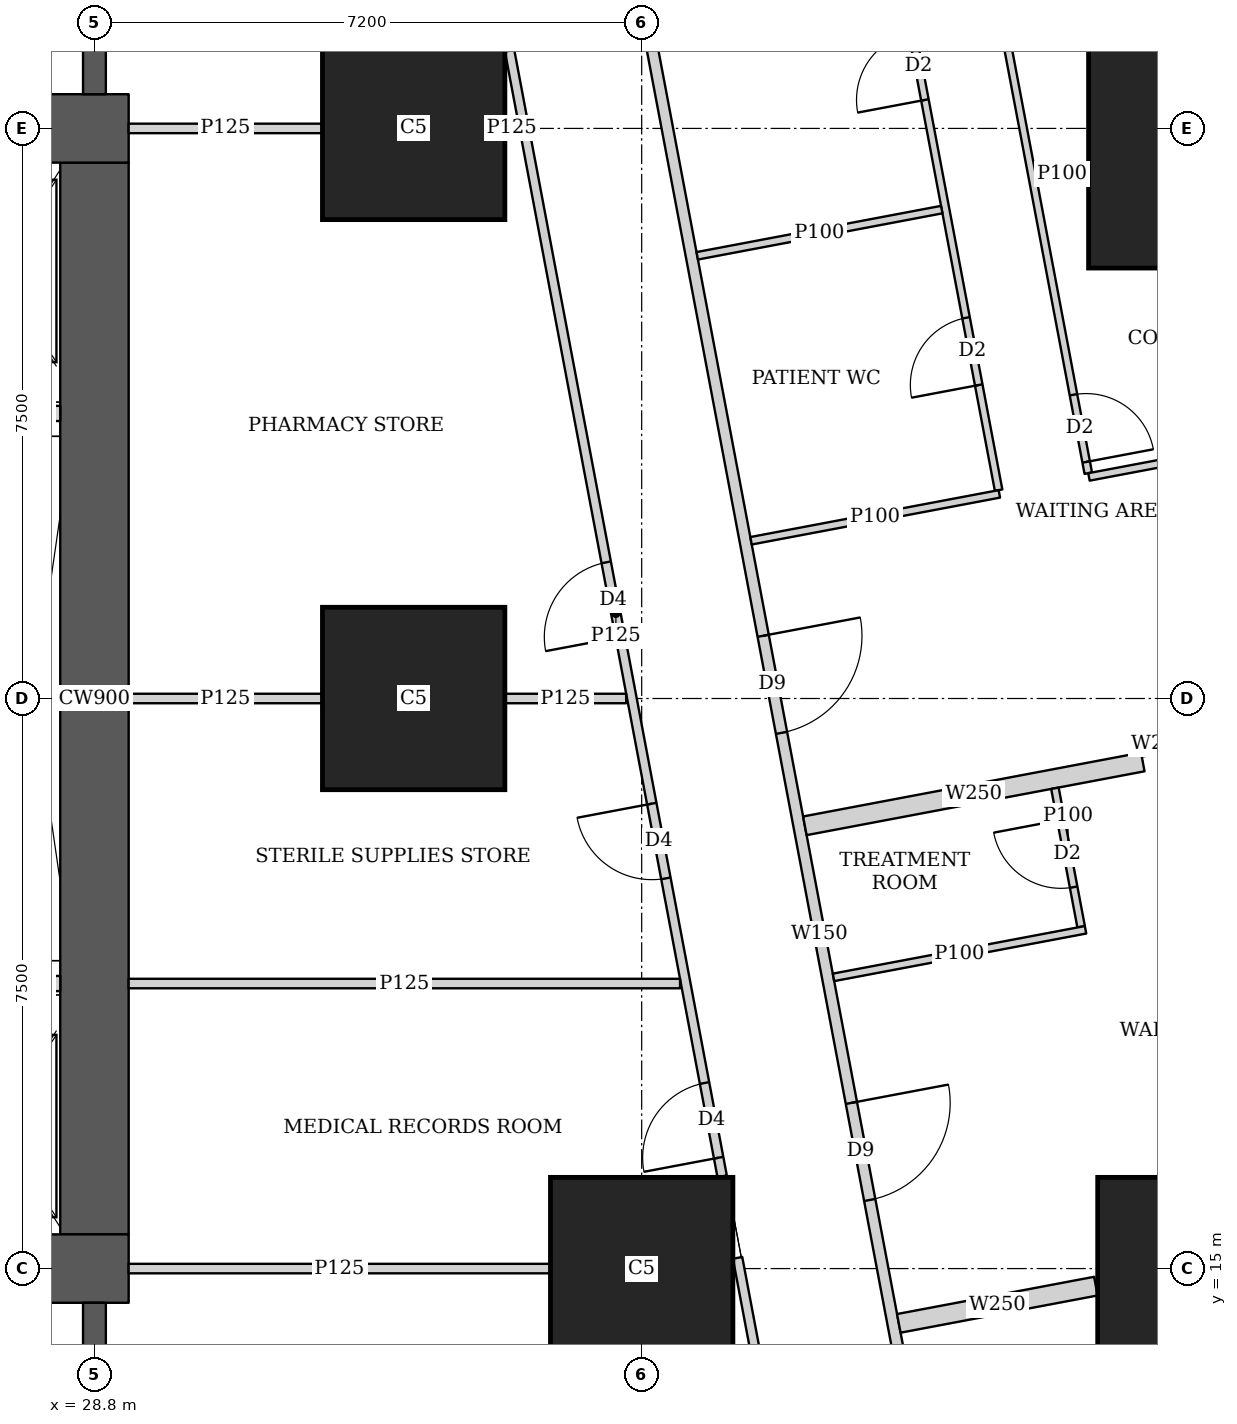
"""IFC4 building model, lengths in metres.
Left out: names, types, materials, properties, quantities, classifications, styles, units other than length and angle.
Written with IfcOpenShell. Run it as: python <this file> out.ifc"""

import sys

from ifc_helpers import new_model, si_unit, direction, frame, frame_2d, origin, origin_2d, place, context, subcontext, project, spatial, rectangle, extrude, element, fill, save


model = new_model("IFC4")
c1 = context("Model", 3, precision=1e-05, world=origin(), true_north=direction((0.0, 1.0)))
c2 = subcontext(c1, "Body", "Model", "MODEL_VIEW")
j1 = project(units=[si_unit("LENGTHUNIT", "METRE"), si_unit("PLANEANGLEUNIT", "RADIAN")], contexts=[c1])
p1 = place(None, origin())
s1 = spatial("IfcSite", under=j1, at=p1, CompositionType="ELEMENT")
p2 = place(p1, origin())
s2 = spatial("IfcBuilding", under=s1, at=p2, CompositionType="ELEMENT")
p3 = place(p2, frame((0.0, 0.0, 5.6)))
s3 = spatial("IfcBuildingStorey", under=s2, at=p3, CompositionType="ELEMENT", Elevation=5.6)
for number, where, z_axis, x_axis in (
    (1, (36.0, 15.0, 0.0), (0.0, 0.0, 1.0), (1.0, 0.0, 0.0)),
    (2, (43.2, 15.0, 0.0), (0.0, 0.0, 1.0), (1.0, 0.0, 0.0)),
    (3, (33.0, 22.5, 0.0), (0.0, 0.0, 1.0), (1.0, 0.0, 0.0)),
    (4, (33.0, 30.0, 0.0), (0.0, 0.0, 1.0), (1.0, 0.0, 0.0)),
):
    element("IfcColumn", number, at=place(p3, frame(where, z_axis=z_axis, x_axis=x_axis)), inside=s3, PredefinedType="COLUMN", context=c2, shape_type="SweptSolid", body=[
        extrude(rectangle(XDim=2.4, YDim=2.4, at=origin_2d()), origin(), (0.0, 0.0, 1.0), 4.5),
    ])
p4 = place(p3, frame((43.48, 29.763, 0.0), z_axis=(0.0, 0.0, 1.0), x_axis=(1.0, 0.0, 0.0)))
e5 = element("IfcColumn", 5, at=p4, inside=s3, PredefinedType="COLUMN", context=c2, shape_type="SweptSolid", body=[
    extrude(rectangle(XDim=3.2, YDim=3.2, at=origin_2d()), origin(), (0.0, 0.0, 1.0), 4.5),
])
p5 = place(p3, frame((13.95, 15.0, 0.0), z_axis=(0.0, 0.0, 1.0), x_axis=(1.0, 0.0, 0.0)))
e6 = element("IfcWall", 6, at=p5, inside=s3, PredefinedType="SHEAR", context=c2, shape_type="SweptSolid", body=[
    extrude(rectangle(XDim=15.3, YDim=0.9, at=frame_2d((7.65, 0.0))), origin(), (0.0, 0.0, 1.0), 4.5),
])
p6 = place(p5, frame((4.45, 0.0, 0.0)))
e7 = element("IfcOpeningElement", 7, at=p6, cuts=e6, PredefinedType="OPENING", context=c2, shape_type="SweptSolid", body=[
    extrude(rectangle(XDim=1.8, YDim=2.1, at=frame_2d((0.9, 1.05))), frame((0.0, 0.46, 0.0), z_axis=(0.0, -1.0, 0.0), x_axis=(1.0, 0.0, 0.0)), (0.0, 0.0, 1.0), 0.92),
])
p7 = place(p5, frame((10.7, 0.0, 0.0)))
e8 = element("IfcOpeningElement", 8, at=p7, cuts=e6, PredefinedType="OPENING", context=c2, shape_type="SweptSolid", body=[
    extrude(rectangle(XDim=1.1, YDim=2.1, at=frame_2d((0.55, 1.05))), frame((0.0, 0.46, 0.0), z_axis=(0.0, -1.0, 0.0), x_axis=(1.0, 0.0, 0.0)), (0.0, 0.0, 1.0), 0.92),
])
p8 = place(p3, frame((13.95, 30.0, 0.0), z_axis=(0.0, 0.0, 1.0), x_axis=(1.0, 0.0, 0.0)))
e9 = element("IfcWall", 9, at=p8, inside=s3, PredefinedType="SHEAR", context=c2, shape_type="SweptSolid", body=[
    extrude(rectangle(XDim=15.3, YDim=0.9, at=frame_2d((7.65, 0.0))), origin(), (0.0, 0.0, 1.0), 4.5),
])
p9 = place(p8, frame((4.45, 0.0, 0.0)))
e10 = element("IfcOpeningElement", 10, at=p9, cuts=e9, PredefinedType="OPENING", context=c2, shape_type="SweptSolid", body=[
    extrude(rectangle(XDim=1.8, YDim=2.1, at=frame_2d((0.9, 1.05))), frame((0.0, 0.46, 0.0), z_axis=(0.0, -1.0, 0.0), x_axis=(1.0, 0.0, 0.0)), (0.0, 0.0, 1.0), 0.92),
])
p10 = place(p8, frame((10.7, 0.0, 0.0)))
e11 = element("IfcOpeningElement", 11, at=p10, cuts=e9, PredefinedType="OPENING", context=c2, shape_type="SweptSolid", body=[
    extrude(rectangle(XDim=1.1, YDim=2.1, at=frame_2d((0.55, 1.05))), frame((0.0, 0.46, 0.0), z_axis=(0.0, -1.0, 0.0), x_axis=(1.0, 0.0, 0.0)), (0.0, 0.0, 1.0), 0.92),
])
p11 = place(p3, frame((28.8, 15.45, 0.0), z_axis=(0.0, 0.0, 1.0), x_axis=(0.0, 1.0, 0.0)))
e12 = element("IfcWall", 12, at=p11, inside=s3, PredefinedType="SHEAR", context=c2, shape_type="SweptSolid", body=[
    extrude(rectangle(XDim=14.1, YDim=0.9, at=frame_2d((7.05, 0.0))), origin(), (0.0, 0.0, 1.0), 4.5),
])
for number, where, z_axis, x_axis in (
    (13, (28.8, 10.35, 0.0), (0.0, 0.0, 1.0), (0.0, 1.0, 0.0)),
    (14, (28.8, 30.45, 0.0), (0.0, 0.0, 1.0), (0.0, 1.0, 0.0)),
):
    element("IfcWall", number, at=place(p3, frame(where, z_axis=z_axis, x_axis=x_axis)), inside=s3, PredefinedType="SHEAR", context=c2, shape_type="SweptSolid", body=[
        extrude(rectangle(XDim=4.2, YDim=0.3, at=frame_2d((2.1, 0.0))), origin(), (0.0, 0.0, 1.0), 4.5),
    ])
p12 = place(p3, frame((35.151, 36.285, 0.0), z_axis=(0.0, 0.0, 1.0), x_axis=(0.18558085056, -0.982628998099, 0.0)))
e15 = element("IfcWall", 15, at=p12, inside=s3, PredefinedType="SOLIDWALL", context=c2, shape_type="SweptSolid", body=[
    extrude(rectangle(XDim=34.352, YDim=0.15, at=frame_2d((17.176, 0.0))), origin(), (0.0, 0.0, 1.0), 2.4),
])
p13 = place(p12, frame((13.189, 0.0, 0.0)))
e16 = element("IfcOpeningElement", 16, at=p13, cuts=e15, PredefinedType="OPENING", context=c2, shape_type="SweptSolid", body=[
    extrude(rectangle(XDim=1.3, YDim=2.1, at=frame_2d((0.65, 1.05))), frame((0.0, 0.085, 0.0), z_axis=(0.0, -1.0, 0.0), x_axis=(1.0, 0.0, 0.0)), (0.0, 0.0, 1.0), 0.17),
])
p14 = place(p12, frame((19.443, 0.0, 0.0)))
e17 = element("IfcOpeningElement", 17, at=p14, cuts=e15, PredefinedType="OPENING", context=c2, shape_type="SweptSolid", body=[
    extrude(rectangle(XDim=1.3, YDim=2.1, at=frame_2d((0.65, 1.05))), frame((0.0, 0.085, 0.0), z_axis=(0.0, -1.0, 0.0), x_axis=(1.0, 0.0, 0.0)), (0.0, 0.0, 1.0), 0.17),
])
p15 = place(p12, frame((25.444, 0.0, 0.0)))
e18 = element("IfcOpeningElement", 18, at=p15, cuts=e15, PredefinedType="OPENING", context=c2, shape_type="SweptSolid", body=[
    extrude(rectangle(XDim=1.3, YDim=2.1, at=frame_2d((0.65, 1.05))), frame((0.0, 0.085, 0.0), z_axis=(0.0, -1.0, 0.0), x_axis=(1.0, 0.0, 0.0)), (0.0, 0.0, 1.0), 0.17),
])
p16 = place(p3, frame((38.956, 40.92, 0.0), z_axis=(0.0, 0.0, 1.0), x_axis=(0.185636914727, -0.982618408077, 0.0)))
e19 = element("IfcWall", 19, at=p16, inside=s3, PredefinedType="PARTITIONING", context=c2, shape_type="SweptSolid", body=[
    extrude(rectangle(XDim=15.729, YDim=0.1, at=frame_2d((7.865, 0.0))), origin(), (0.0, 0.0, 1.0), 2.6),
])
p17 = place(p16, frame((14.679, 0.0, 0.0)))
e20 = element("IfcOpeningElement", 20, at=p17, cuts=e19, PredefinedType="OPENING", context=c2, shape_type="SweptSolid", body=[
    extrude(rectangle(XDim=0.9, YDim=2.1, at=frame_2d((0.45, 1.05))), frame((0.0, 0.06, 0.0), z_axis=(0.0, -1.0, 0.0), x_axis=(1.0, 0.0, 0.0)), (0.0, 0.0, 1.0), 0.12),
])
p18 = place(p16, frame((9.0, 0.0, 0.0)))
e21 = element("IfcOpeningElement", 21, at=p18, cuts=e19, PredefinedType="OPENING", context=c2, shape_type="SweptSolid", body=[
    extrude(rectangle(XDim=0.9, YDim=2.1, at=frame_2d((0.45, 1.05))), frame((0.0, 0.06, 0.0), z_axis=(0.0, -1.0, 0.0), x_axis=(1.0, 0.0, 0.0)), (0.0, 0.0, 1.0), 0.12),
])
p19 = place(p16, frame((7.046, 0.0, 0.0)))
e22 = element("IfcOpeningElement", 22, at=p19, cuts=e19, PredefinedType="OPENING", context=c2, shape_type="SweptSolid", body=[
    extrude(rectangle(XDim=0.9, YDim=2.1, at=frame_2d((0.45, 1.05))), frame((0.0, 0.06, 0.0), z_axis=(0.0, -1.0, 0.0), x_axis=(1.0, 0.0, 0.0)), (0.0, 0.0, 1.0), 0.12),
])
p20 = place(p16, frame((3.231, 0.0, 0.0)))
e23 = element("IfcOpeningElement", 23, at=p20, cuts=e19, PredefinedType="OPENING", context=c2, shape_type="SweptSolid", body=[
    extrude(rectangle(XDim=0.9, YDim=2.1, at=frame_2d((0.45, 1.05))), frame((0.0, 0.06, 0.0), z_axis=(0.0, -1.0, 0.0), x_axis=(1.0, 0.0, 0.0)), (0.0, 0.0, 1.0), 0.12),
])
p21 = place(p3, frame((36.842, 45.65, 0.0), z_axis=(0.0, 0.0, 1.0), x_axis=(0.185559483963, -0.982633033188, 0.0)))
e24 = element("IfcWall", 24, at=p21, inside=s3, PredefinedType="PARTITIONING", context=c2, shape_type="SweptSolid", body=[
    extrude(rectangle(XDim=20.77, YDim=0.1, at=frame_2d((10.385, 0.0))), origin(), (0.0, 0.0, 1.0), 2.4),
])
p22 = place(p21, frame((18.462, 0.0, 0.0)))
e25 = element("IfcOpeningElement", 25, at=p22, cuts=e24, PredefinedType="OPENING", context=c2, shape_type="SweptSolid", body=[
    extrude(rectangle(XDim=0.9, YDim=2.1, at=frame_2d((0.45, 1.05))), frame((0.0, 0.06, 0.0), z_axis=(0.0, -1.0, 0.0), x_axis=(1.0, 0.0, 0.0)), (0.0, 0.0, 1.0), 0.12),
])
p23 = place(p21, frame((14.645, 0.0, 0.0)))
e26 = element("IfcOpeningElement", 26, at=p23, cuts=e24, PredefinedType="OPENING", context=c2, shape_type="SweptSolid", body=[
    extrude(rectangle(XDim=0.9, YDim=2.1, at=frame_2d((0.45, 1.05))), frame((0.0, 0.06, 0.0), z_axis=(0.0, -1.0, 0.0), x_axis=(1.0, 0.0, 0.0)), (0.0, 0.0, 1.0), 0.12),
])
p24 = place(p21, frame((5.655, 0.0, 0.0)))
e27 = element("IfcOpeningElement", 27, at=p24, cuts=e24, PredefinedType="OPENING", context=c2, shape_type="SweptSolid", body=[
    extrude(rectangle(XDim=0.9, YDim=2.1, at=frame_2d((0.45, 1.05))), frame((0.0, 0.06, 0.0), z_axis=(0.0, -1.0, 0.0), x_axis=(1.0, 0.0, 0.0)), (0.0, 0.0, 1.0), 0.12),
])
p25 = place(p3, frame((41.87, 29.459, 0.0), z_axis=(0.0, 0.0, 1.0), x_axis=(-0.982722777639, -0.185083608972, 0.0)))
e28 = element("IfcWall", 28, at=p25, inside=s3, PredefinedType="PARTITIONING", context=c2, shape_type="SweptSolid", body=[
    extrude(rectangle(XDim=0.686, YDim=0.1, at=frame_2d((0.343, 0.0))), origin(), (0.0, 0.0, 1.0), 2.6),
])
p26 = place(p3, frame((46.11, 26.213, 0.0), z_axis=(0.0, 0.0, 1.0), x_axis=(-0.982633535512, -0.185556823879, 0.0)))
e29 = element("IfcWall", 29, at=p26, inside=s3, PredefinedType="PARTITIONING", context=c2, shape_type="SweptSolid", body=[
    extrude(rectangle(XDim=4.3, YDim=0.1, at=frame_2d((2.15, 0.0))), origin(), (0.0, 0.0, 1.0), 2.4),
])
p27 = place(p3, frame((39.948, 28.932, 0.0), z_axis=(0.0, 0.0, 1.0), x_axis=(-0.982610347627, -0.185679575441, 0.0)))
e30 = element("IfcWall", 30, at=p27, inside=s3, PredefinedType="PARTITIONING", context=c2, shape_type="SweptSolid", body=[
    extrude(rectangle(XDim=3.274, YDim=0.1, at=frame_2d((1.637, 0.0))), origin(), (0.0, 0.0, 1.0), 2.6),
])
p28 = place(p3, frame((40.706, 25.192, 0.0), z_axis=(0.0, 0.0, 1.0), x_axis=(-0.982633623707, -0.185556356831, 0.0)))
e31 = element("IfcWall", 31, at=p28, inside=s3, PredefinedType="PARTITIONING", context=c2, shape_type="SweptSolid", body=[
    extrude(rectangle(XDim=3.325, YDim=0.1, at=frame_2d((1.663, 0.0))), origin(), (0.0, 0.0, 1.0), 4.2),
])
p29 = place(p3, frame((41.437, 21.319, 0.0), z_axis=(0.0, 0.0, 1.0), x_axis=(0.186029078128, -0.982544239254, 0.0)))
e32 = element("IfcWall", 32, at=p29, inside=s3, PredefinedType="PARTITIONING", context=c2, shape_type="SweptSolid", body=[
    extrude(rectangle(XDim=1.854, YDim=0.1, at=frame_2d((0.927, 0.0))), origin(), (0.0, 0.0, 1.0), 4.2),
])
p30 = place(p29, frame((0.424, 0.0, 0.0)))
e33 = element("IfcOpeningElement", 33, at=p30, cuts=e32, PredefinedType="OPENING", context=c2, shape_type="SweptSolid", body=[
    extrude(rectangle(XDim=0.9, YDim=2.1, at=frame_2d((0.45, 1.05))), frame((0.0, 0.06, 0.0), z_axis=(0.0, -1.0, 0.0), x_axis=(1.0, 0.0, 0.0)), (0.0, 0.0, 1.0), 0.12),
])
p31 = place(p3, frame((41.84, 19.457, 0.0), z_axis=(0.0, 0.0, 1.0), x_axis=(-0.98264623159, -0.185489577987, 0.0)))
e34 = element("IfcWall", 34, at=p31, inside=s3, PredefinedType="PARTITIONING", context=c2, shape_type="SweptSolid", body=[
    extrude(rectangle(XDim=3.375, YDim=0.1, at=frame_2d((1.688, 0.0))), origin(), (0.0, 0.0, 1.0), 4.2),
])
p32 = place(p3, frame((43.073, 21.956, 0.0), z_axis=(0.0, 0.0, 1.0), x_axis=(-0.982395465615, -0.18681313963, 0.0)))
e35 = element("IfcWall", 35, at=p32, inside=s3, PredefinedType="SOLIDWALL", context=c2, shape_type="SweptSolid", body=[
    extrude(rectangle(XDim=0.525, YDim=0.25, at=frame_2d((0.263, 0.0))), origin(), (0.0, 0.0, 1.0), 2.6),
])
p33 = place(p3, frame((42.593, 21.665, 0.0), z_axis=(0.0, 0.0, 1.0), x_axis=(-0.982612837616, -0.185666398014, 0.0)))
e36 = element("IfcWall", 36, at=p33, inside=s3, PredefinedType="SOLIDWALL", context=c2, shape_type="SweptSolid", body=[
    extrude(rectangle(XDim=4.525, YDim=0.25, at=frame_2d((2.262, 0.0))), origin(), (0.0, 0.0, 1.0), 2.6),
])
p34 = place(p3, frame((41.976, 14.769, 0.0), z_axis=(0.0, 0.0, 1.0), x_axis=(-0.982610412957, -0.185679229715, 0.0)))
e37 = element("IfcWall", 37, at=p34, inside=s3, PredefinedType="SOLIDWALL", context=c2, shape_type="SweptSolid", body=[
    extrude(rectangle(XDim=2.639, YDim=0.25, at=frame_2d((1.319, 0.0))), origin(), (0.0, 0.0, 1.0), 2.6),
])
p35 = place(p3, frame((38.202, 10.163, 0.0), z_axis=(0.0, 0.0, 1.0), x_axis=(-0.185539561605, 0.982636795097, 0.0)))
e38 = element("IfcWall", 38, at=p35, inside=s3, PredefinedType="PARTITIONING", context=c2, shape_type="SweptSolid", body=[
    extrude(rectangle(XDim=5.066, YDim=0.125, at=frame_2d((2.533, 0.0))), origin(), (0.0, 0.0, 1.0), 2.6),
])
p36 = place(p35, frame((0.708, 0.0, 0.0)))
e39 = element("IfcOpeningElement", 39, at=p36, cuts=e38, PredefinedType="OPENING", context=c2, shape_type="SweptSolid", body=[
    extrude(rectangle(XDim=1.0, YDim=2.1, at=frame_2d((0.5, 1.05))), frame((0.0, 0.073, 0.0), z_axis=(0.0, -1.0, 0.0), x_axis=(1.0, 0.0, 0.0)), (0.0, 0.0, 1.0), 0.145),
])
p37 = place(p3, frame((37.059, 16.213, 0.0), z_axis=(0.0, 0.0, 1.0), x_axis=(-0.185585225745, 0.982628171785, 0.0)))
e40 = element("IfcWall", 40, at=p37, inside=s3, PredefinedType="PARTITIONING", context=c2, shape_type="SweptSolid", body=[
    extrude(rectangle(XDim=15.072, YDim=0.125, at=frame_2d((7.536, 0.0))), origin(), (0.0, 0.0, 1.0), 2.6),
])
p38 = place(p37, frame((7.221, 0.0, 0.0)))
e41 = element("IfcOpeningElement", 41, at=p38, cuts=e40, PredefinedType="OPENING", context=c2, shape_type="SweptSolid", body=[
    extrude(rectangle(XDim=1.0, YDim=2.1, at=frame_2d((0.5, 1.05))), frame((0.0, 0.073, 0.0), z_axis=(0.0, -1.0, 0.0), x_axis=(1.0, 0.0, 0.0)), (0.0, 0.0, 1.0), 0.145),
])
p39 = place(p37, frame((0.25, 0.0, 0.0)))
e42 = element("IfcOpeningElement", 42, at=p39, cuts=e40, PredefinedType="OPENING", context=c2, shape_type="SweptSolid", body=[
    extrude(rectangle(XDim=1.0, YDim=2.1, at=frame_2d((0.5, 1.05))), frame((0.0, 0.073, 0.0), z_axis=(0.0, -1.0, 0.0), x_axis=(1.0, 0.0, 0.0)), (0.0, 0.0, 1.0), 0.145),
])
p40 = place(p37, frame((3.99, 0.0, 0.0)))
e43 = element("IfcOpeningElement", 43, at=p40, cuts=e40, PredefinedType="OPENING", context=c2, shape_type="SweptSolid", body=[
    extrude(rectangle(XDim=1.0, YDim=2.1, at=frame_2d((0.5, 1.05))), frame((0.0, 0.073, 0.0), z_axis=(0.0, -1.0, 0.0), x_axis=(1.0, 0.0, 0.0)), (0.0, 0.0, 1.0), 0.145),
])
p41 = place(p3, frame((29.25, 15.0, 0.0), z_axis=(0.0, 0.0, 1.0), x_axis=(1.0, 0.0, 0.0)))
e44 = element("IfcWall", 44, at=p41, inside=s3, PredefinedType="PARTITIONING", context=c2, shape_type="SweptSolid", body=[
    extrude(rectangle(XDim=5.549, YDim=0.125, at=frame_2d((2.774, 0.0))), origin(), (0.0, 0.0, 1.0), 4.2),
])
p42 = place(p3, frame((29.25, 22.5, 0.0), z_axis=(0.0, 0.0, 1.0), x_axis=(1.0, 0.0, 0.0)))
e45 = element("IfcWall", 45, at=p42, inside=s3, PredefinedType="PARTITIONING", context=c2, shape_type="SweptSolid", body=[
    extrude(rectangle(XDim=2.549, YDim=0.125, at=frame_2d((1.274, 0.0))), origin(), (0.0, 0.0, 1.0), 2.6),
])
p43 = place(p3, frame((34.201, 22.5, 0.0), z_axis=(0.0, 0.0, 1.0), x_axis=(1.0, 0.0, 0.0)))
e46 = element("IfcWall", 46, at=p43, inside=s3, PredefinedType="PARTITIONING", context=c2, shape_type="SweptSolid", body=[
    extrude(rectangle(XDim=1.595, YDim=0.125, at=frame_2d((0.797, 0.0))), origin(), (0.0, 0.0, 1.0), 2.6),
])
p44 = place(p3, frame((29.25, 30.0, 0.0), z_axis=(0.0, 0.0, 1.0), x_axis=(1.0, 0.0, 0.0)))
e47 = element("IfcWall", 47, at=p44, inside=s3, PredefinedType="PARTITIONING", context=c2, shape_type="SweptSolid", body=[
    extrude(rectangle(XDim=2.549, YDim=0.125, at=frame_2d((1.274, 0.0))), origin(), (0.0, 0.0, 1.0), 4.2),
])
p45 = place(p3, frame((34.201, 30.0, 0.0), z_axis=(0.0, 0.0, 1.0), x_axis=(1.0, 0.0, 0.0)))
e48 = element("IfcWall", 48, at=p45, inside=s3, PredefinedType="PARTITIONING", context=c2, shape_type="SweptSolid", body=[
    extrude(rectangle(XDim=0.178, YDim=0.125, at=frame_2d((0.089, 0.0))), origin(), (0.0, 0.0, 1.0), 2.6),
])
p46 = place(p3, frame((29.25, 18.75, 0.0), z_axis=(0.0, 0.0, 1.0), x_axis=(1.0, 0.0, 0.0)))
e49 = element("IfcWall", 49, at=p46, inside=s3, PredefinedType="PARTITIONING", context=c2, shape_type="SweptSolid", body=[
    extrude(rectangle(XDim=7.255, YDim=0.125, at=frame_2d((3.627, 0.0))), origin(), (0.0, 0.0, 1.0), 4.2),
])
for number, where, z_axis, x_axis in (
    (50, (27.4, 18.75, 0.0), (0.0, 0.0, 1.0), (1.0, 0.0, 0.0)),
    (51, (27.4, 26.25, 0.0), (0.0, 0.0, 1.0), (1.0, 0.0, 0.0)),
):
    element("IfcWall", number, at=place(p3, frame(where, z_axis=z_axis, x_axis=x_axis)), inside=s3, PredefinedType="SOLIDWALL", context=c2, shape_type="SweptSolid", body=[
        extrude(rectangle(XDim=0.95, YDim=0.2, at=frame_2d((0.475, 0.0))), origin(), (0.0, 0.0, 1.0), 4.2),
    ])
p47 = place(p17, origin())
e52 = element("IfcDoor", 52, at=p47, inside=s3, OperationType="SINGLE_SWING_RIGHT", PredefinedType="DOOR", context=c2, shape_type="SweptSolid", body=[
    extrude(rectangle(XDim=0.9, YDim=2.1, at=frame_2d((0.45, 1.05))), frame((0.0, 0.025, 0.0), z_axis=(0.0, -1.0, 0.0), x_axis=(1.0, 0.0, 0.0)), (0.0, 0.0, 1.0), 0.05),
])
fill(e20, e52)
p48 = place(p22, origin())
e53 = element("IfcDoor", 53, at=p48, inside=s3, OperationType="SINGLE_SWING_LEFT", PredefinedType="DOOR", context=c2, shape_type="SweptSolid", body=[
    extrude(rectangle(XDim=0.9, YDim=2.1, at=frame_2d((0.45, 1.05))), frame((0.0, 0.025, 0.0), z_axis=(0.0, -1.0, 0.0), x_axis=(1.0, 0.0, 0.0)), (0.0, 0.0, 1.0), 0.05),
])
fill(e25, e53)
p49 = place(p23, origin())
e54 = element("IfcDoor", 54, at=p49, inside=s3, OperationType="SINGLE_SWING_LEFT", PredefinedType="DOOR", context=c2, shape_type="SweptSolid", body=[
    extrude(rectangle(XDim=0.9, YDim=2.1, at=frame_2d((0.45, 1.05))), frame((0.0, 0.025, 0.0), z_axis=(0.0, -1.0, 0.0), x_axis=(1.0, 0.0, 0.0)), (0.0, 0.0, 1.0), 0.05),
])
fill(e26, e54)
p50 = place(p13, origin())
e55 = element("IfcDoor", 55, at=p50, inside=s3, OperationType="DOUBLE_DOOR_SINGLE_SWING", PredefinedType="DOOR", context=c2, shape_type="SweptSolid", body=[
    extrude(rectangle(XDim=1.3, YDim=2.1, at=frame_2d((0.65, 1.05))), frame((0.0, 0.025, 0.0), z_axis=(0.0, -1.0, 0.0), x_axis=(1.0, 0.0, 0.0)), (0.0, 0.0, 1.0), 0.05),
])
fill(e16, e55)
p51 = place(p30, origin())
e56 = element("IfcDoor", 56, at=p51, inside=s3, OperationType="SINGLE_SWING_RIGHT", PredefinedType="DOOR", context=c2, shape_type="SweptSolid", body=[
    extrude(rectangle(XDim=0.9, YDim=2.1, at=frame_2d((0.45, 1.05))), frame((0.0, 0.025, 0.0), z_axis=(0.0, -1.0, 0.0), x_axis=(1.0, 0.0, 0.0)), (0.0, 0.0, 1.0), 0.05),
])
fill(e33, e56)
p52 = place(p14, origin())
e57 = element("IfcDoor", 57, at=p52, inside=s3, OperationType="DOUBLE_DOOR_SINGLE_SWING", PredefinedType="DOOR", context=c2, shape_type="SweptSolid", body=[
    extrude(rectangle(XDim=1.3, YDim=2.1, at=frame_2d((0.65, 1.05))), frame((0.0, 0.025, 0.0), z_axis=(0.0, -1.0, 0.0), x_axis=(1.0, 0.0, 0.0)), (0.0, 0.0, 1.0), 0.05),
])
fill(e17, e57)
p53 = place(p38, origin())
e58 = element("IfcDoor", 58, at=p53, inside=s3, OperationType="SINGLE_SWING_LEFT", PredefinedType="DOOR", context=c2, shape_type="SweptSolid", body=[
    extrude(rectangle(XDim=1.0, YDim=2.1, at=frame_2d((0.5, 1.05))), frame((0.0, 0.025, 0.0), z_axis=(0.0, -1.0, 0.0), x_axis=(1.0, 0.0, 0.0)), (0.0, 0.0, 1.0), 0.05),
])
fill(e41, e58)
p54 = place(p39, origin())
e59 = element("IfcDoor", 59, at=p54, inside=s3, OperationType="SINGLE_SWING_LEFT", PredefinedType="DOOR", context=c2, shape_type="SweptSolid", body=[
    extrude(rectangle(XDim=1.0, YDim=2.1, at=frame_2d((0.5, 1.05))), frame((0.0, 0.025, 0.0), z_axis=(0.0, -1.0, 0.0), x_axis=(1.0, 0.0, 0.0)), (0.0, 0.0, 1.0), 0.05),
])
fill(e42, e59)
p55 = place(p40, origin())
e60 = element("IfcDoor", 60, at=p55, inside=s3, OperationType="SINGLE_SWING_RIGHT", PredefinedType="DOOR", context=c2, shape_type="SweptSolid", body=[
    extrude(rectangle(XDim=1.0, YDim=2.1, at=frame_2d((0.5, 1.05))), frame((0.0, 0.025, 0.0), z_axis=(0.0, -1.0, 0.0), x_axis=(1.0, 0.0, 0.0)), (0.0, 0.0, 1.0), 0.05),
])
fill(e43, e60)
save(model, sys.argv[1])
